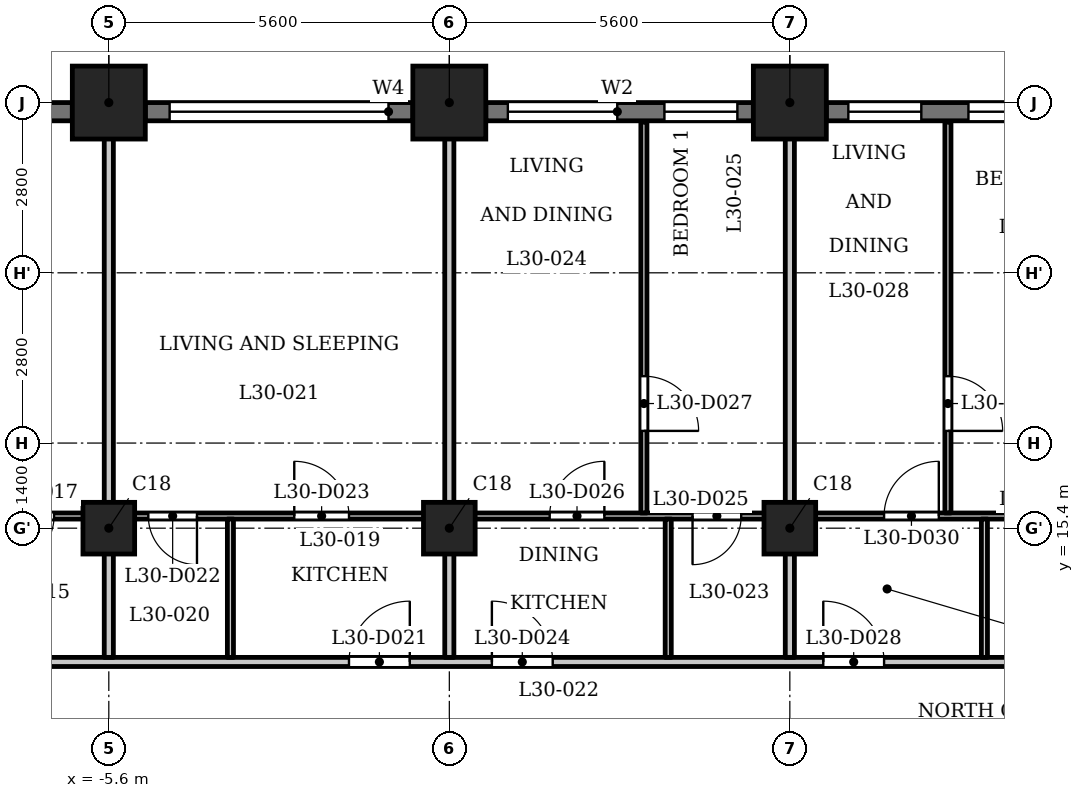
"""IFC4 building model, lengths in metres.
Left out: names, types, materials, properties, quantities, classifications, styles, units other than length and angle.
Written with IfcOpenShell. Run it as: python <this file> out.ifc"""

import sys

from ifc_helpers import new_model, si_unit, direction, frame, frame_2d, origin, origin_2d, place, context, subcontext, project, spatial, rectangle, extrude, element, fill, save


model = new_model("IFC4")
c1 = context("Model", 3, precision=1e-05, world=origin(), true_north=direction((0.0, 1.0)))
c2 = subcontext(c1, "Body", "Model", "MODEL_VIEW")
j1 = project(units=[si_unit("LENGTHUNIT", "METRE"), si_unit("PLANEANGLEUNIT", "RADIAN")], contexts=[c1])
p1 = place(None, origin())
s1 = spatial("IfcSite", under=j1, at=p1, CompositionType="ELEMENT")
p2 = place(p1, origin())
s2 = spatial("IfcBuilding", under=s1, at=p2, CompositionType="ELEMENT")
p3 = place(p2, frame((0.0, 0.0, 118.3)))
s3 = spatial("IfcBuildingStorey", under=s2, at=p3, CompositionType="ELEMENT", Elevation=118.3)
for number, where, z_axis, x_axis in (
    (1, (5.6, 22.4, 0.0), (0.0, 0.0, 1.0), (1.0, 0.0, 0.0)),
    (2, (0.0, 22.4, 0.0), (0.0, 0.0, 1.0), (1.0, 0.0, 0.0)),
    (3, (-5.6, 22.4, 0.0), (0.0, 0.0, 1.0), (1.0, 0.0, 0.0)),
):
    element("IfcColumn", number, at=place(p3, frame(where, z_axis=z_axis, x_axis=x_axis)), inside=s3, PredefinedType="COLUMN", context=c2, shape_type="SweptSolid", body=[
        extrude(rectangle(XDim=1.2, YDim=1.2, at=origin_2d()), origin(), (0.0, 0.0, 1.0), 3.5),
    ])
for number, where, z_axis, x_axis in (
    (4, (-5.6, 15.4, 0.0), (0.0, 0.0, 1.0), (1.0, 0.0, 0.0)),
    (5, (0.0, 15.4, 0.0), (0.0, 0.0, 1.0), (1.0, 0.0, 0.0)),
    (6, (5.6, 15.4, 0.0), (0.0, 0.0, 1.0), (1.0, 0.0, 0.0)),
):
    element("IfcColumn", number, at=place(p3, frame(where, z_axis=z_axis, x_axis=x_axis)), inside=s3, PredefinedType="COLUMN", context=c2, shape_type="SweptSolid", body=[
        extrude(rectangle(XDim=0.85, YDim=0.85, at=origin_2d()), origin(), (0.0, 0.0, 1.0), 3.5),
    ])
p4 = place(p3, frame((10.6, 22.25, 0.0), z_axis=(0.0, 0.0, 1.0), x_axis=(-1.0, 0.0, 0.0)))
e7 = element("IfcWall", 7, at=p4, inside=s3, PredefinedType="SOLIDWALL", context=c2, shape_type="SweptSolid", body=[
    extrude(rectangle(XDim=4.4, YDim=0.3, at=frame_2d((2.2, 0.0))), origin(), (0.0, 0.0, 1.0), 2.4),
])
p5 = place(p4, frame((0.262, 0.0, 0.9)))
e8 = element("IfcOpeningElement", 8, at=p5, cuts=e7, PredefinedType="OPENING", context=c2, shape_type="SweptSolid", body=[
    extrude(rectangle(XDim=1.8, YDim=1.25, at=frame_2d((0.9, 0.625))), frame((0.0, 0.16, 0.0), z_axis=(0.0, -1.0, 0.0), x_axis=(1.0, 0.0, 0.0)), (0.0, 0.0, 1.0), 0.32),
])
p6 = place(p4, frame((2.837, 0.0, 0.6)))
e9 = element("IfcOpeningElement", 9, at=p6, cuts=e7, PredefinedType="OPENING", context=c2, shape_type="SweptSolid", body=[
    extrude(rectangle(XDim=1.2, YDim=1.55, at=frame_2d((0.6, 0.775))), frame((0.0, 0.16, 0.0), z_axis=(0.0, -1.0, 0.0), x_axis=(1.0, 0.0, 0.0)), (0.0, 0.0, 1.0), 0.32),
])
p7 = place(p3, frame((5.0, 22.25, 0.0), z_axis=(0.0, 0.0, 1.0), x_axis=(-1.0, 0.0, 0.0)))
e10 = element("IfcWall", 10, at=p7, inside=s3, PredefinedType="SOLIDWALL", context=c2, shape_type="SweptSolid", body=[
    extrude(rectangle(XDim=4.4, YDim=0.3, at=frame_2d((2.2, 0.0))), origin(), (0.0, 0.0, 1.0), 2.4),
])
p8 = place(p7, frame((0.262, 0.0, 0.6)))
e11 = element("IfcOpeningElement", 11, at=p8, cuts=e10, PredefinedType="OPENING", context=c2, shape_type="SweptSolid", body=[
    extrude(rectangle(XDim=1.2, YDim=1.55, at=frame_2d((0.6, 0.775))), frame((0.0, 0.16, 0.0), z_axis=(0.0, -1.0, 0.0), x_axis=(1.0, 0.0, 0.0)), (0.0, 0.0, 1.0), 0.32),
])
p9 = place(p7, frame((2.238, 0.0, 0.9)))
e12 = element("IfcOpeningElement", 12, at=p9, cuts=e10, PredefinedType="OPENING", context=c2, shape_type="SweptSolid", body=[
    extrude(rectangle(XDim=1.8, YDim=1.25, at=frame_2d((0.9, 0.625))), frame((0.0, 0.16, 0.0), z_axis=(0.0, -1.0, 0.0), x_axis=(1.0, 0.0, 0.0)), (0.0, 0.0, 1.0), 0.32),
])
p10 = place(p3, frame((-0.6, 22.25, 0.0), z_axis=(0.0, 0.0, 1.0), x_axis=(-1.0, 0.0, 0.0)))
e13 = element("IfcWall", 13, at=p10, inside=s3, PredefinedType="SOLIDWALL", context=c2, shape_type="SweptSolid", body=[
    extrude(rectangle(XDim=4.4, YDim=0.3, at=frame_2d((2.2, 0.0))), origin(), (0.0, 0.0, 1.0), 2.4),
])
p11 = place(p10, frame((0.4, 0.0, 1.2)))
e14 = element("IfcOpeningElement", 14, at=p11, cuts=e13, PredefinedType="OPENING", context=c2, shape_type="SweptSolid", body=[
    extrude(rectangle(XDim=3.6, YDim=0.95, at=frame_2d((1.8, 0.475))), frame((0.0, 0.16, 0.0), z_axis=(0.0, -1.0, 0.0), x_axis=(1.0, 0.0, 0.0)), (0.0, 0.0, 1.0), 0.32),
])
p12 = place(p3, frame((-6.2, 22.25, 0.0), z_axis=(0.0, 0.0, 1.0), x_axis=(-1.0, 0.0, 0.0)))
e15 = element("IfcWall", 15, at=p12, inside=s3, PredefinedType="SOLIDWALL", context=c2, shape_type="SweptSolid", body=[
    extrude(rectangle(XDim=4.4, YDim=0.3, at=frame_2d((2.2, 0.0))), origin(), (0.0, 0.0, 1.0), 2.4),
])
p13 = place(p12, frame((0.4, 0.0, 1.2)))
e16 = element("IfcOpeningElement", 16, at=p13, cuts=e15, PredefinedType="OPENING", context=c2, shape_type="SweptSolid", body=[
    extrude(rectangle(XDim=3.6, YDim=0.95, at=frame_2d((1.8, 0.475))), frame((0.0, 0.16, 0.0), z_axis=(0.0, -1.0, 0.0), x_axis=(1.0, 0.0, 0.0)), (0.0, 0.0, 1.0), 0.32),
])
p14 = place(p3, frame((-17.4, 13.2, 0.0), z_axis=(0.0, 0.0, 1.0), x_axis=(1.0, 0.0, 0.0)))
e17 = element("IfcWall", 17, at=p14, inside=s3, PredefinedType="PARTITIONING", context=c2, shape_type="SweptSolid", body=[
    extrude(rectangle(XDim=34.8, YDim=0.15, at=frame_2d((17.4, 0.0))), origin(), (0.0, 0.0, 1.0), 3.2),
])
p15 = place(p14, frame((0.25, 0.0, 0.0)))
e18 = element("IfcOpeningElement", 18, at=p15, cuts=e17, PredefinedType="OPENING", context=c2, shape_type="SweptSolid", body=[
    extrude(rectangle(XDim=1.0, YDim=2.1, at=frame_2d((0.5, 1.05))), frame((0.0, 0.085, 0.0), z_axis=(0.0, -1.0, 0.0), x_axis=(1.0, 0.0, 0.0)), (0.0, 0.0, 1.0), 0.17),
])
p16 = place(p14, frame((33.65, 0.0, 0.0)))
e19 = element("IfcOpeningElement", 19, at=p16, cuts=e17, PredefinedType="OPENING", context=c2, shape_type="SweptSolid", body=[
    extrude(rectangle(XDim=1.0, YDim=2.1, at=frame_2d((0.5, 1.05))), frame((0.0, 0.085, 0.0), z_axis=(0.0, -1.0, 0.0), x_axis=(1.0, 0.0, 0.0)), (0.0, 0.0, 1.0), 0.17),
])
p17 = place(p14, frame((15.75, 0.0, 0.0)))
e20 = element("IfcOpeningElement", 20, at=p17, cuts=e17, PredefinedType="OPENING", context=c2, shape_type="SweptSolid", body=[
    extrude(rectangle(XDim=1.0, YDim=2.1, at=frame_2d((0.5, 1.05))), frame((0.0, 0.085, 0.0), z_axis=(0.0, -1.0, 0.0), x_axis=(1.0, 0.0, 0.0)), (0.0, 0.0, 1.0), 0.17),
])
p18 = place(p14, frame((18.1, 0.0, 0.0)))
e21 = element("IfcOpeningElement", 21, at=p18, cuts=e17, PredefinedType="OPENING", context=c2, shape_type="SweptSolid", body=[
    extrude(rectangle(XDim=1.0, YDim=2.1, at=frame_2d((0.5, 1.05))), frame((0.0, 0.085, 0.0), z_axis=(0.0, -1.0, 0.0), x_axis=(1.0, 0.0, 0.0)), (0.0, 0.0, 1.0), 0.17),
])
p19 = place(p14, frame((23.55, 0.0, 0.0)))
e22 = element("IfcOpeningElement", 22, at=p19, cuts=e17, PredefinedType="OPENING", context=c2, shape_type="SweptSolid", body=[
    extrude(rectangle(XDim=1.0, YDim=2.1, at=frame_2d((0.5, 1.05))), frame((0.0, 0.085, 0.0), z_axis=(0.0, -1.0, 0.0), x_axis=(1.0, 0.0, 0.0)), (0.0, 0.0, 1.0), 0.17),
])
p20 = place(p3, frame((-16.725, 15.6, 0.0), z_axis=(0.0, 0.0, 1.0), x_axis=(1.0, 0.0, 0.0)))
e23 = element("IfcWall", 23, at=p20, inside=s3, PredefinedType="PARTITIONING", context=c2, shape_type="SweptSolid", body=[
    extrude(rectangle(XDim=33.45, YDim=0.1, at=frame_2d((16.725, 0.0))), origin(), (0.0, 0.0, 1.0), 3.2),
])
p21 = place(p20, frame((9.425, 0.0, 0.0)))
e24 = element("IfcOpeningElement", 24, at=p21, cuts=e23, PredefinedType="OPENING", context=c2, shape_type="SweptSolid", body=[
    extrude(rectangle(XDim=0.8, YDim=2.1, at=frame_2d((0.4, 1.05))), frame((0.0, 0.06, 0.0), z_axis=(0.0, -1.0, 0.0), x_axis=(1.0, 0.0, 0.0)), (0.0, 0.0, 1.0), 0.12),
])
p22 = place(p20, frame((6.975, 0.0, 0.0)))
e25 = element("IfcOpeningElement", 25, at=p22, cuts=e23, PredefinedType="OPENING", context=c2, shape_type="SweptSolid", body=[
    extrude(rectangle(XDim=0.9, YDim=2.1, at=frame_2d((0.45, 1.05))), frame((0.0, 0.06, 0.0), z_axis=(0.0, -1.0, 0.0), x_axis=(1.0, 0.0, 0.0)), (0.0, 0.0, 1.0), 0.12),
])
p23 = place(p20, frame((1.875, 0.0, 0.0)))
e26 = element("IfcOpeningElement", 26, at=p23, cuts=e23, PredefinedType="OPENING", context=c2, shape_type="SweptSolid", body=[
    extrude(rectangle(XDim=0.9, YDim=2.1, at=frame_2d((0.45, 1.05))), frame((0.0, 0.06, 0.0), z_axis=(0.0, -1.0, 0.0), x_axis=(1.0, 0.0, 0.0)), (0.0, 0.0, 1.0), 0.12),
])
p24 = place(p20, frame((3.475, 0.0, 0.0)))
e27 = element("IfcOpeningElement", 27, at=p24, cuts=e23, PredefinedType="OPENING", context=c2, shape_type="SweptSolid", body=[
    extrude(rectangle(XDim=0.9, YDim=2.1, at=frame_2d((0.45, 1.05))), frame((0.0, 0.06, 0.0), z_axis=(0.0, -1.0, 0.0), x_axis=(1.0, 0.0, 0.0)), (0.0, 0.0, 1.0), 0.12),
])
p25 = place(p20, frame((11.775, 0.0, 0.0)))
e28 = element("IfcOpeningElement", 28, at=p25, cuts=e23, PredefinedType="OPENING", context=c2, shape_type="SweptSolid", body=[
    extrude(rectangle(XDim=0.8, YDim=2.1, at=frame_2d((0.4, 1.05))), frame((0.0, 0.06, 0.0), z_axis=(0.0, -1.0, 0.0), x_axis=(1.0, 0.0, 0.0)), (0.0, 0.0, 1.0), 0.12),
])
p26 = place(p20, frame((14.175, 0.0, 0.0)))
e29 = element("IfcOpeningElement", 29, at=p26, cuts=e23, PredefinedType="OPENING", context=c2, shape_type="SweptSolid", body=[
    extrude(rectangle(XDim=0.9, YDim=2.1, at=frame_2d((0.45, 1.05))), frame((0.0, 0.06, 0.0), z_axis=(0.0, -1.0, 0.0), x_axis=(1.0, 0.0, 0.0)), (0.0, 0.0, 1.0), 0.12),
])
p27 = place(p20, frame((20.725, 0.0, 0.0)))
e30 = element("IfcOpeningElement", 30, at=p27, cuts=e23, PredefinedType="OPENING", context=c2, shape_type="SweptSolid", body=[
    extrude(rectangle(XDim=0.8, YDim=2.1, at=frame_2d((0.4, 1.05))), frame((0.0, 0.06, 0.0), z_axis=(0.0, -1.0, 0.0), x_axis=(1.0, 0.0, 0.0)), (0.0, 0.0, 1.0), 0.12),
])
p28 = place(p20, frame((18.375, 0.0, 0.0)))
e31 = element("IfcOpeningElement", 31, at=p28, cuts=e23, PredefinedType="OPENING", context=c2, shape_type="SweptSolid", body=[
    extrude(rectangle(XDim=0.9, YDim=2.1, at=frame_2d((0.45, 1.05))), frame((0.0, 0.06, 0.0), z_axis=(0.0, -1.0, 0.0), x_axis=(1.0, 0.0, 0.0)), (0.0, 0.0, 1.0), 0.12),
])
p29 = place(p20, frame((26.425, 0.0, 0.0)))
e32 = element("IfcOpeningElement", 32, at=p29, cuts=e23, PredefinedType="OPENING", context=c2, shape_type="SweptSolid", body=[
    extrude(rectangle(XDim=0.8, YDim=2.1, at=frame_2d((0.4, 1.05))), frame((0.0, 0.06, 0.0), z_axis=(0.0, -1.0, 0.0), x_axis=(1.0, 0.0, 0.0)), (0.0, 0.0, 1.0), 0.12),
])
p30 = place(p20, frame((23.875, 0.0, 0.0)))
e33 = element("IfcOpeningElement", 33, at=p30, cuts=e23, PredefinedType="OPENING", context=c2, shape_type="SweptSolid", body=[
    extrude(rectangle(XDim=0.9, YDim=2.1, at=frame_2d((0.45, 1.05))), frame((0.0, 0.06, 0.0), z_axis=(0.0, -1.0, 0.0), x_axis=(1.0, 0.0, 0.0)), (0.0, 0.0, 1.0), 0.12),
])
p31 = place(p20, frame((28.575, 0.0, 0.0)))
e34 = element("IfcOpeningElement", 34, at=p31, cuts=e23, PredefinedType="OPENING", context=c2, shape_type="SweptSolid", body=[
    extrude(rectangle(XDim=0.8, YDim=2.1, at=frame_2d((0.4, 1.05))), frame((0.0, 0.06, 0.0), z_axis=(0.0, -1.0, 0.0), x_axis=(1.0, 0.0, 0.0)), (0.0, 0.0, 1.0), 0.12),
])
p32 = place(p20, frame((30.725, 0.0, 0.0)))
e35 = element("IfcOpeningElement", 35, at=p32, cuts=e23, PredefinedType="OPENING", context=c2, shape_type="SweptSolid", body=[
    extrude(rectangle(XDim=0.9, YDim=2.1, at=frame_2d((0.45, 1.05))), frame((0.0, 0.06, 0.0), z_axis=(0.0, -1.0, 0.0), x_axis=(1.0, 0.0, 0.0)), (0.0, 0.0, 1.0), 0.12),
])
p33 = place(p3, frame((-5.6, 13.275, 0.0), z_axis=(0.0, 0.0, 1.0), x_axis=(0.0, 1.0, 0.0)))
e36 = element("IfcWall", 36, at=p33, inside=s3, PredefinedType="PARTITIONING", context=c2, shape_type="SweptSolid", body=[
    extrude(rectangle(XDim=2.275, YDim=0.15, at=frame_2d((1.138, 0.0))), origin(), (0.0, 0.0, 1.0), 3.2),
])
p34 = place(p3, frame((-5.6, 15.65, 0.0), z_axis=(0.0, 0.0, 1.0), x_axis=(0.0, 1.0, 0.0)))
e37 = element("IfcWall", 37, at=p34, inside=s3, PredefinedType="PARTITIONING", context=c2, shape_type="SweptSolid", body=[
    extrude(rectangle(XDim=7.33, YDim=0.15, at=frame_2d((3.665, 0.0))), origin(), (0.0, 0.0, 1.0), 3.2),
])
p35 = place(p3, frame((-3.6, 13.275, 0.0), z_axis=(0.0, 0.0, 1.0), x_axis=(0.0, 1.0, 0.0)))
e38 = element("IfcWall", 38, at=p35, inside=s3, PredefinedType="PARTITIONING", context=c2, shape_type="SweptSolid", body=[
    extrude(rectangle(XDim=2.275, YDim=0.1, at=frame_2d((1.138, 0.0))), origin(), (0.0, 0.0, 1.0), 3.2),
])
p36 = place(p3, frame((0.0, 13.275, 0.0), z_axis=(0.0, 0.0, 1.0), x_axis=(0.0, 1.0, 0.0)))
e39 = element("IfcWall", 39, at=p36, inside=s3, PredefinedType="PARTITIONING", context=c2, shape_type="SweptSolid", body=[
    extrude(rectangle(XDim=2.275, YDim=0.15, at=frame_2d((1.138, 0.0))), origin(), (0.0, 0.0, 1.0), 3.2),
])
p37 = place(p3, frame((0.0, 15.65, 0.0), z_axis=(0.0, 0.0, 1.0), x_axis=(0.0, 1.0, 0.0)))
e40 = element("IfcWall", 40, at=p37, inside=s3, PredefinedType="PARTITIONING", context=c2, shape_type="SweptSolid", body=[
    extrude(rectangle(XDim=7.33, YDim=0.15, at=frame_2d((3.665, 0.0))), origin(), (0.0, 0.0, 1.0), 3.2),
])
p38 = place(p3, frame((3.2, 15.65, 0.0), z_axis=(0.0, 0.0, 1.0), x_axis=(0.0, 1.0, 0.0)))
e41 = element("IfcWall", 41, at=p38, inside=s3, PredefinedType="PARTITIONING", context=c2, shape_type="SweptSolid", body=[
    extrude(rectangle(XDim=6.43, YDim=0.1, at=frame_2d((3.215, 0.0))), origin(), (0.0, 0.0, 1.0), 3.2),
])
p39 = place(p38, frame((1.35, 0.0, 0.0)))
e42 = element("IfcOpeningElement", 42, at=p39, cuts=e41, PredefinedType="OPENING", context=c2, shape_type="SweptSolid", body=[
    extrude(rectangle(XDim=0.9, YDim=2.1, at=frame_2d((0.45, 1.05))), frame((0.0, 0.06, 0.0), z_axis=(0.0, -1.0, 0.0), x_axis=(1.0, 0.0, 0.0)), (0.0, 0.0, 1.0), 0.12),
])
p40 = place(p3, frame((3.6, 13.275, 0.0), z_axis=(0.0, 0.0, 1.0), x_axis=(0.0, 1.0, 0.0)))
e43 = element("IfcWall", 43, at=p40, inside=s3, PredefinedType="PARTITIONING", context=c2, shape_type="SweptSolid", body=[
    extrude(rectangle(XDim=2.275, YDim=0.1, at=frame_2d((1.138, 0.0))), origin(), (0.0, 0.0, 1.0), 3.2),
])
p41 = place(p3, frame((5.6, 13.275, 0.0), z_axis=(0.0, 0.0, 1.0), x_axis=(0.0, 1.0, 0.0)))
e44 = element("IfcWall", 44, at=p41, inside=s3, PredefinedType="PARTITIONING", context=c2, shape_type="SweptSolid", body=[
    extrude(rectangle(XDim=2.275, YDim=0.15, at=frame_2d((1.138, 0.0))), origin(), (0.0, 0.0, 1.0), 3.2),
])
p42 = place(p3, frame((5.6, 15.65, 0.0), z_axis=(0.0, 0.0, 1.0), x_axis=(0.0, 1.0, 0.0)))
e45 = element("IfcWall", 45, at=p42, inside=s3, PredefinedType="PARTITIONING", context=c2, shape_type="SweptSolid", body=[
    extrude(rectangle(XDim=7.33, YDim=0.15, at=frame_2d((3.665, 0.0))), origin(), (0.0, 0.0, 1.0), 3.2),
])
p43 = place(p3, frame((8.2, 15.65, 0.0), z_axis=(0.0, 0.0, 1.0), x_axis=(0.0, 1.0, 0.0)))
e46 = element("IfcWall", 46, at=p43, inside=s3, PredefinedType="PARTITIONING", context=c2, shape_type="SweptSolid", body=[
    extrude(rectangle(XDim=6.43, YDim=0.1, at=frame_2d((3.215, 0.0))), origin(), (0.0, 0.0, 1.0), 3.2),
])
p44 = place(p43, frame((1.35, 0.0, 0.0)))
e47 = element("IfcOpeningElement", 47, at=p44, cuts=e46, PredefinedType="OPENING", context=c2, shape_type="SweptSolid", body=[
    extrude(rectangle(XDim=0.9, YDim=2.1, at=frame_2d((0.45, 1.05))), frame((0.0, 0.06, 0.0), z_axis=(0.0, -1.0, 0.0), x_axis=(1.0, 0.0, 0.0)), (0.0, 0.0, 1.0), 0.12),
])
p45 = place(p3, frame((8.8, 13.275, 0.0), z_axis=(0.0, 0.0, 1.0), x_axis=(0.0, 1.0, 0.0)))
e48 = element("IfcWall", 48, at=p45, inside=s3, PredefinedType="PARTITIONING", context=c2, shape_type="SweptSolid", body=[
    extrude(rectangle(XDim=2.275, YDim=0.1, at=frame_2d((1.138, 0.0))), origin(), (0.0, 0.0, 1.0), 3.2),
])
p46 = place(p21, origin())
e49 = element("IfcDoor", 49, at=p46, inside=s3, OperationType="SINGLE_SWING_LEFT", PredefinedType="DOOR", context=c2, shape_type="SweptSolid", body=[
    extrude(rectangle(XDim=0.8, YDim=2.1, at=frame_2d((0.4, 1.05))), frame((0.0, 0.025, 0.0), z_axis=(0.0, -1.0, 0.0), x_axis=(1.0, 0.0, 0.0)), (0.0, 0.0, 1.0), 0.05),
])
fill(e24, e49)
p47 = place(p17, origin())
e50 = element("IfcDoor", 50, at=p47, inside=s3, OperationType="SINGLE_SWING_LEFT", PredefinedType="DOOR", context=c2, shape_type="SweptSolid", body=[
    extrude(rectangle(XDim=1.0, YDim=2.1, at=frame_2d((0.5, 1.05))), frame((0.0, 0.025, 0.0), z_axis=(0.0, -1.0, 0.0), x_axis=(1.0, 0.0, 0.0)), (0.0, 0.0, 1.0), 0.05),
])
fill(e20, e50)
p48 = place(p25, origin())
e51 = element("IfcDoor", 51, at=p48, inside=s3, OperationType="SINGLE_SWING_RIGHT", PredefinedType="DOOR", context=c2, shape_type="SweptSolid", body=[
    extrude(rectangle(XDim=0.8, YDim=2.1, at=frame_2d((0.4, 1.05))), frame((0.0, 0.025, 0.0), z_axis=(0.0, -1.0, 0.0), x_axis=(1.0, 0.0, 0.0)), (0.0, 0.0, 1.0), 0.05),
])
fill(e28, e51)
p49 = place(p26, origin())
e52 = element("IfcDoor", 52, at=p49, inside=s3, OperationType="SINGLE_SWING_RIGHT", PredefinedType="DOOR", context=c2, shape_type="SweptSolid", body=[
    extrude(rectangle(XDim=0.9, YDim=2.1, at=frame_2d((0.45, 1.05))), frame((0.0, 0.025, 0.0), z_axis=(0.0, -1.0, 0.0), x_axis=(1.0, 0.0, 0.0)), (0.0, 0.0, 1.0), 0.05),
])
fill(e29, e52)
p50 = place(p18, origin())
e53 = element("IfcDoor", 53, at=p50, inside=s3, OperationType="SINGLE_SWING_RIGHT", PredefinedType="DOOR", context=c2, shape_type="SweptSolid", body=[
    extrude(rectangle(XDim=1.0, YDim=2.1, at=frame_2d((0.5, 1.05))), frame((0.0, 0.025, 0.0), z_axis=(0.0, -1.0, 0.0), x_axis=(1.0, 0.0, 0.0)), (0.0, 0.0, 1.0), 0.05),
])
fill(e21, e53)
p51 = place(p27, origin())
e54 = element("IfcDoor", 54, at=p51, inside=s3, OperationType="SINGLE_SWING_LEFT", PredefinedType="DOOR", context=c2, shape_type="SweptSolid", body=[
    extrude(rectangle(XDim=0.8, YDim=2.1, at=frame_2d((0.4, 1.05))), frame((0.0, 0.025, 0.0), z_axis=(0.0, -1.0, 0.0), x_axis=(1.0, 0.0, 0.0)), (0.0, 0.0, 1.0), 0.05),
])
fill(e30, e54)
p52 = place(p28, origin())
e55 = element("IfcDoor", 55, at=p52, inside=s3, OperationType="SINGLE_SWING_LEFT", PredefinedType="DOOR", context=c2, shape_type="SweptSolid", body=[
    extrude(rectangle(XDim=0.9, YDim=2.1, at=frame_2d((0.45, 1.05))), frame((0.0, 0.025, 0.0), z_axis=(0.0, -1.0, 0.0), x_axis=(1.0, 0.0, 0.0)), (0.0, 0.0, 1.0), 0.05),
])
fill(e31, e55)
p53 = place(p39, origin())
e56 = element("IfcDoor", 56, at=p53, inside=s3, OperationType="SINGLE_SWING_LEFT", PredefinedType="DOOR", context=c2, shape_type="SweptSolid", body=[
    extrude(rectangle(XDim=0.9, YDim=2.1, at=frame_2d((0.45, 1.05))), frame((0.0, 0.025, 0.0), z_axis=(0.0, -1.0, 0.0), x_axis=(1.0, 0.0, 0.0)), (0.0, 0.0, 1.0), 0.05),
])
fill(e42, e56)
p54 = place(p19, origin())
e57 = element("IfcDoor", 57, at=p54, inside=s3, OperationType="SINGLE_SWING_RIGHT", PredefinedType="DOOR", context=c2, shape_type="SweptSolid", body=[
    extrude(rectangle(XDim=1.0, YDim=2.1, at=frame_2d((0.5, 1.05))), frame((0.0, 0.025, 0.0), z_axis=(0.0, -1.0, 0.0), x_axis=(1.0, 0.0, 0.0)), (0.0, 0.0, 1.0), 0.05),
])
fill(e22, e57)
p55 = place(p30, origin())
e58 = element("IfcDoor", 58, at=p55, inside=s3, OperationType="SINGLE_SWING_LEFT", PredefinedType="DOOR", context=c2, shape_type="SweptSolid", body=[
    extrude(rectangle(XDim=0.9, YDim=2.1, at=frame_2d((0.45, 1.05))), frame((0.0, 0.025, 0.0), z_axis=(0.0, -1.0, 0.0), x_axis=(1.0, 0.0, 0.0)), (0.0, 0.0, 1.0), 0.05),
])
fill(e33, e58)
p56 = place(p44, origin())
e59 = element("IfcDoor", 59, at=p56, inside=s3, OperationType="SINGLE_SWING_LEFT", PredefinedType="DOOR", context=c2, shape_type="SweptSolid", body=[
    extrude(rectangle(XDim=0.9, YDim=2.1, at=frame_2d((0.45, 1.05))), frame((0.0, 0.025, 0.0), z_axis=(0.0, -1.0, 0.0), x_axis=(1.0, 0.0, 0.0)), (0.0, 0.0, 1.0), 0.05),
])
fill(e47, e59)
p57 = place(p5, origin())
e60 = element("IfcWindow", 60, at=p57, inside=s3, PartitioningType="SINGLE_PANEL", PredefinedType="WINDOW", context=c2, shape_type="SweptSolid", body=[
    extrude(rectangle(XDim=1.8, YDim=1.25, at=frame_2d((0.9, 0.625))), frame((0.0, 0.03, 0.0), z_axis=(0.0, -1.0, 0.0), x_axis=(1.0, 0.0, 0.0)), (0.0, 0.0, 1.0), 0.06),
])
fill(e8, e60)
p58 = place(p6, origin())
e61 = element("IfcWindow", 61, at=p58, inside=s3, PartitioningType="SINGLE_PANEL", PredefinedType="WINDOW", context=c2, shape_type="SweptSolid", body=[
    extrude(rectangle(XDim=1.2, YDim=1.55, at=frame_2d((0.6, 0.775))), frame((0.0, 0.03, 0.0), z_axis=(0.0, -1.0, 0.0), x_axis=(1.0, 0.0, 0.0)), (0.0, 0.0, 1.0), 0.06),
])
fill(e9, e61)
p59 = place(p8, origin())
e62 = element("IfcWindow", 62, at=p59, inside=s3, PartitioningType="SINGLE_PANEL", PredefinedType="WINDOW", context=c2, shape_type="SweptSolid", body=[
    extrude(rectangle(XDim=1.2, YDim=1.55, at=frame_2d((0.6, 0.775))), frame((0.0, 0.03, 0.0), z_axis=(0.0, -1.0, 0.0), x_axis=(1.0, 0.0, 0.0)), (0.0, 0.0, 1.0), 0.06),
])
fill(e11, e62)
p60 = place(p9, origin())
e63 = element("IfcWindow", 63, at=p60, inside=s3, PartitioningType="SINGLE_PANEL", PredefinedType="WINDOW", context=c2, shape_type="SweptSolid", body=[
    extrude(rectangle(XDim=1.8, YDim=1.25, at=frame_2d((0.9, 0.625))), frame((0.0, 0.03, 0.0), z_axis=(0.0, -1.0, 0.0), x_axis=(1.0, 0.0, 0.0)), (0.0, 0.0, 1.0), 0.06),
])
fill(e12, e63)
p61 = place(p11, origin())
e64 = element("IfcWindow", 64, at=p61, inside=s3, PartitioningType="SINGLE_PANEL", PredefinedType="WINDOW", context=c2, shape_type="SweptSolid", body=[
    extrude(rectangle(XDim=3.6, YDim=0.95, at=frame_2d((1.8, 0.475))), frame((0.0, 0.03, 0.0), z_axis=(0.0, -1.0, 0.0), x_axis=(1.0, 0.0, 0.0)), (0.0, 0.0, 1.0), 0.06),
])
fill(e14, e64)
save(model, sys.argv[1])
